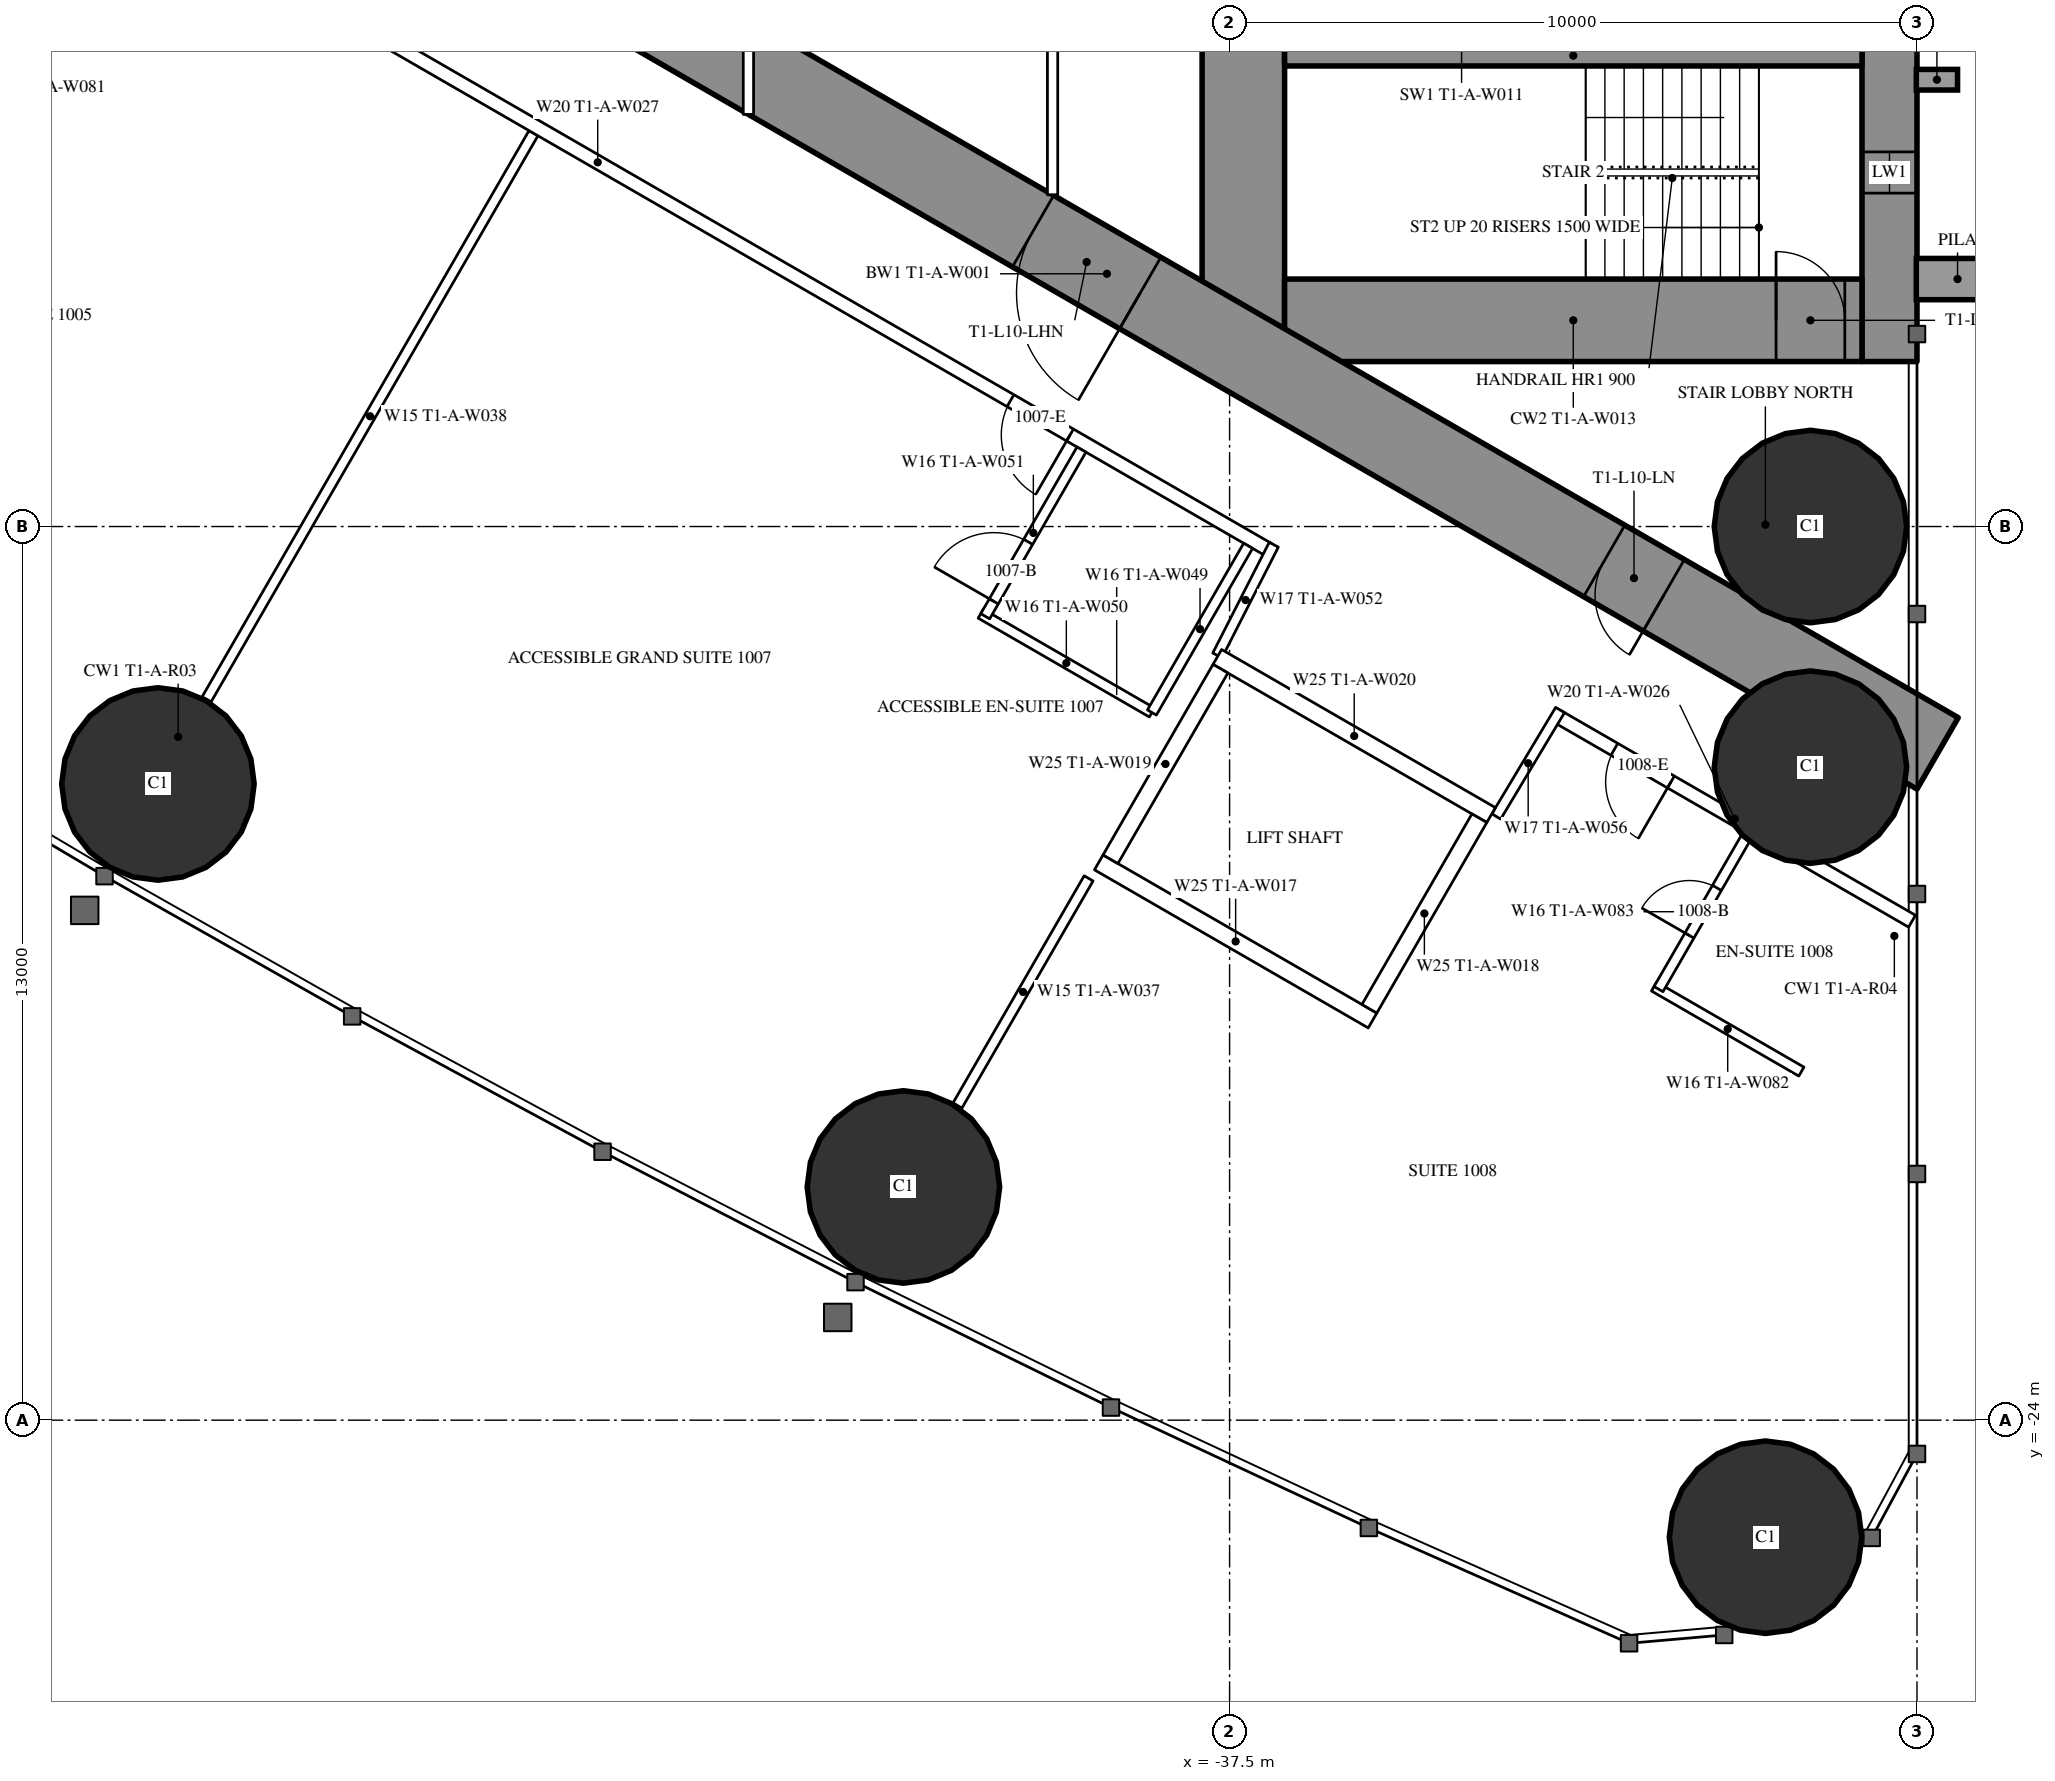
"""IFC4 building model, lengths in metres.
Left out: names, types, materials, properties, quantities, classifications, styles, units other than length and angle.
Written with IfcOpenShell. Run it as: python <this file> out.ifc"""

import sys

from ifc_helpers import new_model, si_unit, direction, frame, frame_2d, origin, origin_2d, place, context, subcontext, project, spatial, rectangle, hollow_circle, extrude, element, fill, save


model = new_model("IFC4")
c1 = context("Model", 3, precision=1e-05, world=origin(), true_north=direction((0.0, 1.0)))
c2 = subcontext(c1, "Body", "Model", "MODEL_VIEW")
j1 = project(units=[si_unit("LENGTHUNIT", "METRE"), si_unit("PLANEANGLEUNIT", "RADIAN")], contexts=[c1])
p1 = place(None, origin())
s1 = spatial("IfcSite", under=j1, at=p1, CompositionType="ELEMENT")
p2 = place(p1, origin())
s2 = spatial("IfcBuilding", under=s1, at=p2, CompositionType="ELEMENT")
p3 = place(p2, frame((0.0, 0.0, 42.5)))
s3 = spatial("IfcBuildingStorey", under=s2, at=p3, CompositionType="ELEMENT", Elevation=42.5)
for number, where, z_axis, x_axis in (
    (1, (-29.703, -25.703, 0.0), (0.0, 0.0, 1.0), (1.0, 0.0, 0.0)),
    (2, (-29.05, -11.0, 0.0), (0.0, 0.0, 1.0), (1.0, 0.0, 0.0)),
    (3, (-29.05, -14.5, 0.0), (0.0, 0.0, 1.0), (1.0, 0.0, 0.0)),
    (4, (-53.09, -14.745, 0.0), (0.0, 0.0, 1.0), (1.0, 0.0, 0.0)),
    (5, (-42.245, -20.607, 0.0), (0.0, 0.0, 1.0), (1.0, 0.0, 0.0)),
):
    element("IfcColumn", number, at=place(p3, frame(where, z_axis=z_axis, x_axis=x_axis)), inside=s3, PredefinedType="COLUMN", context=c2, shape_type="SweptSolid", body=[
        extrude(hollow_circle(Radius=1.4, WallThickness=0.12, at=origin_2d()), origin(), (0.0, 0.0, 1.0), 3.5),
    ])
p4 = place(p3, frame((-27.9, 8.6, 0.0), z_axis=(0.0, 0.0, 1.0), x_axis=(0.0, -1.0, 0.0)))
e6 = element("IfcWall", 6, at=p4, inside=s3, PredefinedType="SHEAR", context=c2, shape_type="SweptSolid", body=[
    extrude(rectangle(XDim=17.2, YDim=0.8, at=frame_2d((8.6, 0.0))), origin(), (0.0, 0.0, 1.0), 3.5),
])
p5 = place(p4, frame((2.45, 0.0, 0.6)))
e7 = element("IfcOpeningElement", 7, at=p5, cuts=e6, PredefinedType="OPENING", context=c2, shape_type="SweptSolid", body=[
    extrude(rectangle(XDim=0.6, YDim=2.1, at=frame_2d((0.3, 1.05))), frame((0.0, 0.41, 0.0), z_axis=(0.0, -1.0, 0.0), x_axis=(1.0, 0.0, 0.0)), (0.0, 0.0, 1.0), 0.82),
])
p6 = place(p4, frame((14.15, 0.0, 0.6)))
e8 = element("IfcOpeningElement", 8, at=p6, cuts=e6, PredefinedType="OPENING", context=c2, shape_type="SweptSolid", body=[
    extrude(rectangle(XDim=0.6, YDim=2.1, at=frame_2d((0.3, 1.05))), frame((0.0, 0.41, 0.0), z_axis=(0.0, -1.0, 0.0), x_axis=(1.0, 0.0, 0.0)), (0.0, 0.0, 1.0), 0.82),
])
p7 = place(p3, frame((-37.3, 8.6, 0.0), z_axis=(0.0, 0.0, 1.0), x_axis=(0.0, -1.0, 0.0)))
e9 = element("IfcWall", 9, at=p7, inside=s3, PredefinedType="SHEAR", context=c2, shape_type="SweptSolid", body=[
    extrude(rectangle(XDim=17.2, YDim=1.2, at=frame_2d((8.6, 0.0))), origin(), (0.0, 0.0, 1.0), 3.5),
])
p8 = place(p7, frame((7.7, 0.0, 0.0)))
e10 = element("IfcOpeningElement", 10, at=p8, cuts=e9, PredefinedType="OPENING", context=c2, shape_type="SweptSolid", body=[
    extrude(rectangle(XDim=1.8, YDim=2.2, at=frame_2d((0.9, 1.1))), frame((0.0, 0.61, 0.0), z_axis=(0.0, -1.0, 0.0), x_axis=(1.0, 0.0, 0.0)), (0.0, 0.0, 1.0), 1.22),
])
p9 = place(p3, frame((-28.3, -8.0, 0.0), z_axis=(0.0, 0.0, 1.0), x_axis=(-1.0, 0.0, 0.0)))
e11 = element("IfcWall", 11, at=p9, inside=s3, PredefinedType="SHEAR", context=c2, shape_type="SweptSolid", body=[
    extrude(rectangle(XDim=8.4, YDim=1.2, at=frame_2d((4.2, 0.0))), origin(), (0.0, 0.0, 1.0), 3.5),
])
p10 = place(p9, frame((0.25, 0.0, 0.0)))
e12 = element("IfcOpeningElement", 12, at=p10, cuts=e11, PredefinedType="OPENING", context=c2, shape_type="SweptSolid", body=[
    extrude(rectangle(XDim=1.0, YDim=2.2, at=frame_2d((0.5, 1.1))), frame((0.0, 0.61, 0.0), z_axis=(0.0, -1.0, 0.0), x_axis=(1.0, 0.0, 0.0)), (0.0, 0.0, 1.0), 1.22),
])
p11 = place(p3, frame((-28.3, -4.15, 0.0), z_axis=(0.0, 0.0, 1.0), x_axis=(-1.0, 0.0, 0.0)))
e13 = element("IfcWall", 13, at=p11, inside=s3, PredefinedType="SHEAR", context=c2, shape_type="SweptSolid", body=[
    extrude(rectangle(XDim=8.4, YDim=0.3, at=frame_2d((4.2, 0.0))), origin(), (0.0, 0.0, 1.0), 3.5),
])
p12 = place(p3, frame((-27.2, -14.3, 0.0), z_axis=(0.0, 0.0, 1.0), x_axis=(-0.866024021859, 0.500002393557, 0.0)))
e14 = element("IfcWall", 14, at=p12, inside=s3, PredefinedType="SHEAR", context=c2, shape_type="SweptSolid", body=[
    extrude(rectangle(XDim=27.907, YDim=1.2, at=frame_2d((13.954, 0.0))), origin(), (0.0, 0.0, 1.0), 3.5),
])
p13 = place(p12, frame((4.6, 0.0, 0.0)))
e15 = element("IfcOpeningElement", 15, at=p13, cuts=e14, PredefinedType="OPENING", context=c2, shape_type="SweptSolid", body=[
    extrude(rectangle(XDim=1.0, YDim=2.2, at=frame_2d((0.5, 1.1))), frame((0.0, 0.61, 0.0), z_axis=(0.0, -1.0, 0.0), x_axis=(1.0, 0.0, 0.0)), (0.0, 0.0, 1.0), 1.22),
])
p14 = place(p12, frame((13.395, 0.0, 0.0)))
e16 = element("IfcOpeningElement", 16, at=p14, cuts=e14, PredefinedType="OPENING", context=c2, shape_type="SweptSolid", body=[
    extrude(rectangle(XDim=1.8, YDim=2.2, at=frame_2d((0.9, 1.1))), frame((0.0, 0.61, 0.0), z_axis=(0.0, -1.0, 0.0), x_axis=(1.0, 0.0, 0.0)), (0.0, 0.0, 1.0), 1.22),
])
p15 = place(p3, frame((-47.627, -5.278, 0.0), z_axis=(0.0, 0.0, 1.0), x_axis=(-0.500009844318, -0.86601972009, 0.0)))
e17 = element("IfcWall", 17, at=p15, inside=s3, PredefinedType="PARTITIONING", context=c2, shape_type="SweptSolid", body=[
    extrude(rectangle(XDim=9.51, YDim=0.15, at=frame_2d((4.755, 0.0))), origin(), (0.0, 0.0, 1.0), 2.25),
])
p16 = place(p3, frame((-39.551, -16.118, 0.0), z_axis=(0.0, 0.0, 1.0), x_axis=(-0.499986503906, -0.866033195618, 0.0)))
e18 = element("IfcWall", 18, at=p16, inside=s3, PredefinedType="PARTITIONING", context=c2, shape_type="SweptSolid", body=[
    extrude(rectangle(XDim=3.815, YDim=0.15, at=frame_2d((1.907, 0.0))), origin(), (0.0, 0.0, 1.0), 3.25),
])
p17 = place(p3, frame((-27.572, -16.741, 0.0), z_axis=(0.0, 0.0, 1.0), x_axis=(-0.866024464444, 0.500001626982, 0.0)))
e19 = element("IfcWall", 19, at=p17, inside=s3, PredefinedType="PARTITIONING", context=c2, shape_type="SweptSolid", body=[
    extrude(rectangle(XDim=5.955, YDim=0.2, at=frame_2d((2.978, 0.0))), origin(), (0.0, 0.0, 1.0), 3.25),
])
p18 = place(p17, frame((4.05, 0.0, 0.0)))
e20 = element("IfcOpeningElement", 20, at=p18, cuts=e19, PredefinedType="OPENING", context=c2, shape_type="SweptSolid", body=[
    extrude(rectangle(XDim=0.95, YDim=2.2, at=frame_2d((0.475, 1.1))), frame((0.0, 0.11, 0.0), z_axis=(0.0, -1.0, 0.0), x_axis=(1.0, 0.0, 0.0)), (0.0, 0.0, 1.0), 0.22),
])
p19 = place(p3, frame((-36.92, -11.344, 0.0), z_axis=(0.0, 0.0, 1.0), x_axis=(-0.866028313256, 0.499994960614, 0.0)))
e21 = element("IfcWall", 21, at=p19, inside=s3, PredefinedType="PARTITIONING", context=c2, shape_type="SweptSolid", body=[
    extrude(rectangle(XDim=22.568, YDim=0.2, at=frame_2d((11.284, 0.0))), origin(), (0.0, 0.0, 1.0), 3.25),
])
p20 = place(p19, frame((21.018, 0.0, 0.0)))
e22 = element("IfcOpeningElement", 22, at=p20, cuts=e21, PredefinedType="OPENING", context=c2, shape_type="SweptSolid", body=[
    extrude(rectangle(XDim=0.95, YDim=2.2, at=frame_2d((0.475, 1.1))), frame((0.0, 0.11, 0.0), z_axis=(0.0, -1.0, 0.0), x_axis=(1.0, 0.0, 0.0)), (0.0, 0.0, 1.0), 0.22),
])
p21 = place(p19, frame((3.35, 0.0, 0.0)))
e23 = element("IfcOpeningElement", 23, at=p21, cuts=e21, PredefinedType="OPENING", context=c2, shape_type="SweptSolid", body=[
    extrude(rectangle(XDim=1.0, YDim=2.2, at=frame_2d((0.5, 1.1))), frame((0.0, 0.11, 0.0), z_axis=(0.0, -1.0, 0.0), x_axis=(1.0, 0.0, 0.0)), (0.0, 0.0, 1.0), 0.22),
])
p22 = place(p3, frame((-36.857, -11.265, 0.0), z_axis=(0.0, 0.0, 1.0), x_axis=(-0.454225294761, -0.890886851176, 0.0)))
e24 = element("IfcWall", 24, at=p22, inside=s3, PredefinedType="PARTITIONING", context=c2, shape_type="SweptSolid", body=[
    extrude(rectangle(XDim=1.807, YDim=0.15, at=frame_2d((0.904, 0.0))), origin(), (0.0, 0.0, 1.0), 3.25),
])
p23 = place(p3, frame((-33.621, -15.218, 0.0), z_axis=(0.0, 0.0, 1.0), x_axis=(0.514336634837, 0.857588377991, 0.0)))
e25 = element("IfcWall", 25, at=p23, inside=s3, PredefinedType="PARTITIONING", context=c2, shape_type="SweptSolid", body=[
    extrude(rectangle(XDim=1.805, YDim=0.15, at=frame_2d((0.903, 0.0))), origin(), (0.0, 0.0, 1.0), 3.25),
])
p24 = place(p3, frame((-38.63, -13.705, 0.0), z_axis=(0.0, 0.0, 1.0), x_axis=(-0.866018712932, 0.500011588718, 0.0)))
e26 = element("IfcWall", 26, at=p24, inside=s3, PredefinedType="PARTITIONING", context=c2, shape_type="SweptSolid", body=[
    extrude(rectangle(XDim=2.875, YDim=0.15, at=frame_2d((1.438, 0.0))), origin(), (0.0, 0.0, 1.0), 3.25),
])
p25 = place(p3, frame((-39.655, -9.88, 0.0), z_axis=(0.0, 0.0, 1.0), x_axis=(-0.500049511043, -0.865996816683, 0.0)))
e27 = element("IfcWall", 27, at=p25, inside=s3, PredefinedType="PARTITIONING", context=c2, shape_type="SweptSolid", body=[
    extrude(rectangle(XDim=2.8, YDim=0.15, at=frame_2d((1.4, 0.0))), origin(), (0.0, 0.0, 1.0), 3.25),
])
p26 = place(p25, frame((1.55, 0.0, 0.0)))
e28 = element("IfcOpeningElement", 28, at=p26, cuts=e27, PredefinedType="OPENING", context=c2, shape_type="SweptSolid", body=[
    extrude(rectangle(XDim=1.0, YDim=2.2, at=frame_2d((0.5, 1.1))), frame((0.0, 0.085, 0.0), z_axis=(0.0, -1.0, 0.0), x_axis=(1.0, 0.0, 0.0)), (0.0, 0.0, 1.0), 0.17),
])
p27 = place(p3, frame((-37.23, -11.281, 0.0), z_axis=(0.0, 0.0, 1.0), x_axis=(-0.500049511043, -0.865996816683, 0.0)))
e29 = element("IfcWall", 29, at=p27, inside=s3, PredefinedType="PARTITIONING", context=c2, shape_type="SweptSolid", body=[
    extrude(rectangle(XDim=2.8, YDim=0.15, at=frame_2d((1.4, 0.0))), origin(), (0.0, 0.0, 1.0), 3.25),
])
p28 = place(p3, frame((-29.182, -18.929, 0.0), z_axis=(0.0, 0.0, 1.0), x_axis=(-0.866006523861, 0.500032699561, 0.0)))
e30 = element("IfcWall", 30, at=p28, inside=s3, PredefinedType="PARTITIONING", context=c2, shape_type="SweptSolid", body=[
    extrude(rectangle(XDim=2.475, YDim=0.15, at=frame_2d((1.237, 0.0))), origin(), (0.0, 0.0, 1.0), 3.25),
])
p29 = place(p3, frame((-29.96, -15.478, 0.0), z_axis=(0.0, 0.0, 1.0), x_axis=(-0.500006934395, -0.866021400173, 0.0)))
e31 = element("IfcWall", 31, at=p29, inside=s3, PredefinedType="PARTITIONING", context=c2, shape_type="SweptSolid", body=[
    extrude(rectangle(XDim=2.6, YDim=0.15, at=frame_2d((1.3, 0.0))), origin(), (0.0, 0.0, 1.0), 3.25),
])
p30 = place(p29, frame((0.9, 0.0, 0.0)))
e32 = element("IfcOpeningElement", 32, at=p30, cuts=e31, PredefinedType="OPENING", context=c2, shape_type="SweptSolid", body=[
    extrude(rectangle(XDim=0.8, YDim=2.2, at=frame_2d((0.4, 1.1))), frame((0.0, 0.085, 0.0), z_axis=(0.0, -1.0, 0.0), x_axis=(1.0, 0.0, 0.0)), (0.0, 0.0, 1.0), 0.17),
])
p31 = place(p3, frame((-40.075, 1.2, 0.0), z_axis=(0.0, 0.0, 1.0), x_axis=(0.0, -1.0, 0.0)))
e33 = element("IfcWall", 33, at=p31, inside=s3, PredefinedType="PARTITIONING", context=c2, shape_type="SweptSolid", body=[
    extrude(rectangle(XDim=7.374, YDim=0.15, at=frame_2d((3.687, 0.0))), origin(), (0.0, 0.0, 1.0), 3.25),
])
p32 = place(p31, frame((2.787, 0.0, 0.0)))
e34 = element("IfcOpeningElement", 34, at=p32, cuts=e33, PredefinedType="OPENING", context=c2, shape_type="SweptSolid", body=[
    extrude(rectangle(XDim=1.8, YDim=2.2, at=frame_2d((0.9, 1.1))), frame((0.0, 0.085, 0.0), z_axis=(0.0, -1.0, 0.0), x_axis=(1.0, 0.0, 0.0)), (0.0, 0.0, 1.0), 0.17),
])
p33 = place(p3, frame((-44.5, 5.005, 0.0), z_axis=(0.0, 0.0, 1.0), x_axis=(0.0, -1.0, 0.0)))
e35 = element("IfcWall", 35, at=p33, inside=s3, PredefinedType="PARTITIONING", context=c2, shape_type="SweptSolid", body=[
    extrude(rectangle(XDim=10.009, YDim=0.15, at=frame_2d((5.005, 0.0))), origin(), (0.0, 0.0, 1.0), 2.45),
])
p34 = place(p33, frame((4.505, 0.0, 0.0)))
e36 = element("IfcOpeningElement", 36, at=p34, cuts=e35, PredefinedType="OPENING", context=c2, shape_type="SweptSolid", body=[
    extrude(rectangle(XDim=1.0, YDim=2.2, at=frame_2d((0.5, 1.1))), frame((0.0, 0.085, 0.0), z_axis=(0.0, -1.0, 0.0), x_axis=(1.0, 0.0, 0.0)), (0.0, 0.0, 1.0), 0.17),
])
p35 = place(p3, frame((-33.696, -15.197, 0.0), z_axis=(0.0, 0.0, 1.0), x_axis=(-0.865976953817, 0.500083908417, 0.0)))
e37 = element("IfcWall", 37, at=p35, inside=s3, PredefinedType="PARTITIONING", context=c2, shape_type="SweptSolid", body=[
    extrude(rectangle(XDim=4.599, YDim=0.25, at=frame_2d((2.3, 0.0))), origin(), (0.0, 0.0, 1.0), 3.25),
])
p36 = place(p3, frame((-35.42, -18.186, 0.0), z_axis=(0.0, 0.0, 1.0), x_axis=(-0.865990227814, 0.50006092162, 0.0)))
e38 = element("IfcWall", 38, at=p36, inside=s3, PredefinedType="PARTITIONING", context=c2, shape_type="SweptSolid", body=[
    extrude(rectangle(XDim=4.6, YDim=0.25, at=frame_2d((2.3, 0.0))), origin(), (0.0, 0.0, 1.0), 3.25),
])
p37 = place(p3, frame((-33.866, -15.243, 0.0), z_axis=(0.0, 0.0, 1.0), x_axis=(-0.499929347863, -0.866066190972, 0.0)))
e39 = element("IfcWall", 39, at=p37, inside=s3, PredefinedType="PARTITIONING", context=c2, shape_type="SweptSolid", body=[
    extrude(rectangle(XDim=3.201, YDim=0.25, at=frame_2d((1.6, 0.0))), origin(), (0.0, 0.0, 1.0), 3.25),
])
p38 = place(p3, frame((-37.633, -13.068, 0.0), z_axis=(0.0, 0.0, 1.0), x_axis=(-0.499872130319, -0.866099216793, 0.0)))
e40 = element("IfcWall", 40, at=p38, inside=s3, PredefinedType="PARTITIONING", context=c2, shape_type="SweptSolid", body=[
    extrude(rectangle(XDim=3.2, YDim=0.25, at=frame_2d((1.6, 0.0))), origin(), (0.0, 0.0, 1.0), 3.25),
])
p39 = place(p26, origin())
e41 = element("IfcDoor", 41, at=p39, inside=s3, OperationType="SINGLE_SWING_RIGHT", PredefinedType="DOOR", context=c2, shape_type="SweptSolid", body=[
    extrude(rectangle(XDim=1.0, YDim=2.2, at=frame_2d((0.5, 1.1))), frame((0.0, 0.025, 0.0), z_axis=(0.0, -1.0, 0.0), x_axis=(1.0, 0.0, 0.0)), (0.0, 0.0, 1.0), 0.05),
])
fill(e28, e41)
p40 = place(p21, origin())
e42 = element("IfcDoor", 42, at=p40, inside=s3, OperationType="SINGLE_SWING_LEFT", PredefinedType="DOOR", context=c2, shape_type="SweptSolid", body=[
    extrude(rectangle(XDim=1.0, YDim=2.2, at=frame_2d((0.5, 1.1))), frame((0.0, 0.025, 0.0), z_axis=(0.0, -1.0, 0.0), x_axis=(1.0, 0.0, 0.0)), (0.0, 0.0, 1.0), 0.05),
])
fill(e23, e42)
p41 = place(p30, origin())
e43 = element("IfcDoor", 43, at=p41, inside=s3, OperationType="SINGLE_SWING_RIGHT", PredefinedType="DOOR", context=c2, shape_type="SweptSolid", body=[
    extrude(rectangle(XDim=0.8, YDim=2.2, at=frame_2d((0.4, 1.1))), frame((0.0, 0.025, 0.0), z_axis=(0.0, -1.0, 0.0), x_axis=(1.0, 0.0, 0.0)), (0.0, 0.0, 1.0), 0.05),
])
fill(e32, e43)
p42 = place(p18, origin())
e44 = element("IfcDoor", 44, at=p42, inside=s3, OperationType="SINGLE_SWING_LEFT", PredefinedType="DOOR", context=c2, shape_type="SweptSolid", body=[
    extrude(rectangle(XDim=0.95, YDim=2.2, at=frame_2d((0.475, 1.1))), frame((0.0, 0.025, 0.0), z_axis=(0.0, -1.0, 0.0), x_axis=(1.0, 0.0, 0.0)), (0.0, 0.0, 1.0), 0.05),
])
fill(e20, e44)
p43 = place(p13, origin())
e45 = element("IfcDoor", 45, at=p43, inside=s3, OperationType="SINGLE_SWING_LEFT", PredefinedType="DOOR", context=c2, shape_type="SweptSolid", body=[
    extrude(rectangle(XDim=1.0, YDim=2.2, at=frame_2d((0.5, 1.1))), frame((0.0, 0.025, 0.0), z_axis=(0.0, -1.0, 0.0), x_axis=(1.0, 0.0, 0.0)), (0.0, 0.0, 1.0), 0.05),
])
fill(e15, e45)
p44 = place(p14, origin())
e46 = element("IfcDoor", 46, at=p44, inside=s3, OperationType="DOUBLE_DOOR_SINGLE_SWING", PredefinedType="DOOR", context=c2, shape_type="SweptSolid", body=[
    extrude(rectangle(XDim=1.8, YDim=2.2, at=frame_2d((0.9, 1.1))), frame((0.0, 0.025, 0.0), z_axis=(0.0, -1.0, 0.0), x_axis=(1.0, 0.0, 0.0)), (0.0, 0.0, 1.0), 0.05),
])
fill(e16, e46)
p45 = place(p10, origin())
e47 = element("IfcDoor", 47, at=p45, inside=s3, OperationType="SINGLE_SWING_RIGHT", PredefinedType="DOOR", context=c2, shape_type="SweptSolid", body=[
    extrude(rectangle(XDim=1.0, YDim=2.2, at=frame_2d((0.5, 1.1))), frame((0.0, 0.025, 0.0), z_axis=(0.0, -1.0, 0.0), x_axis=(1.0, 0.0, 0.0)), (0.0, 0.0, 1.0), 0.05),
])
fill(e12, e47)
p46 = place(p6, origin())
e48 = element("IfcWindow", 48, at=p46, inside=s3, PartitioningType="SINGLE_PANEL", PredefinedType="WINDOW", context=c2, shape_type="SweptSolid", body=[
    extrude(rectangle(XDim=0.6, YDim=2.1, at=frame_2d((0.3, 1.05))), frame((0.0, 0.03, 0.0), z_axis=(0.0, -1.0, 0.0), x_axis=(1.0, 0.0, 0.0)), (0.0, 0.0, 1.0), 0.06),
])
fill(e8, e48)
save(model, sys.argv[1])
